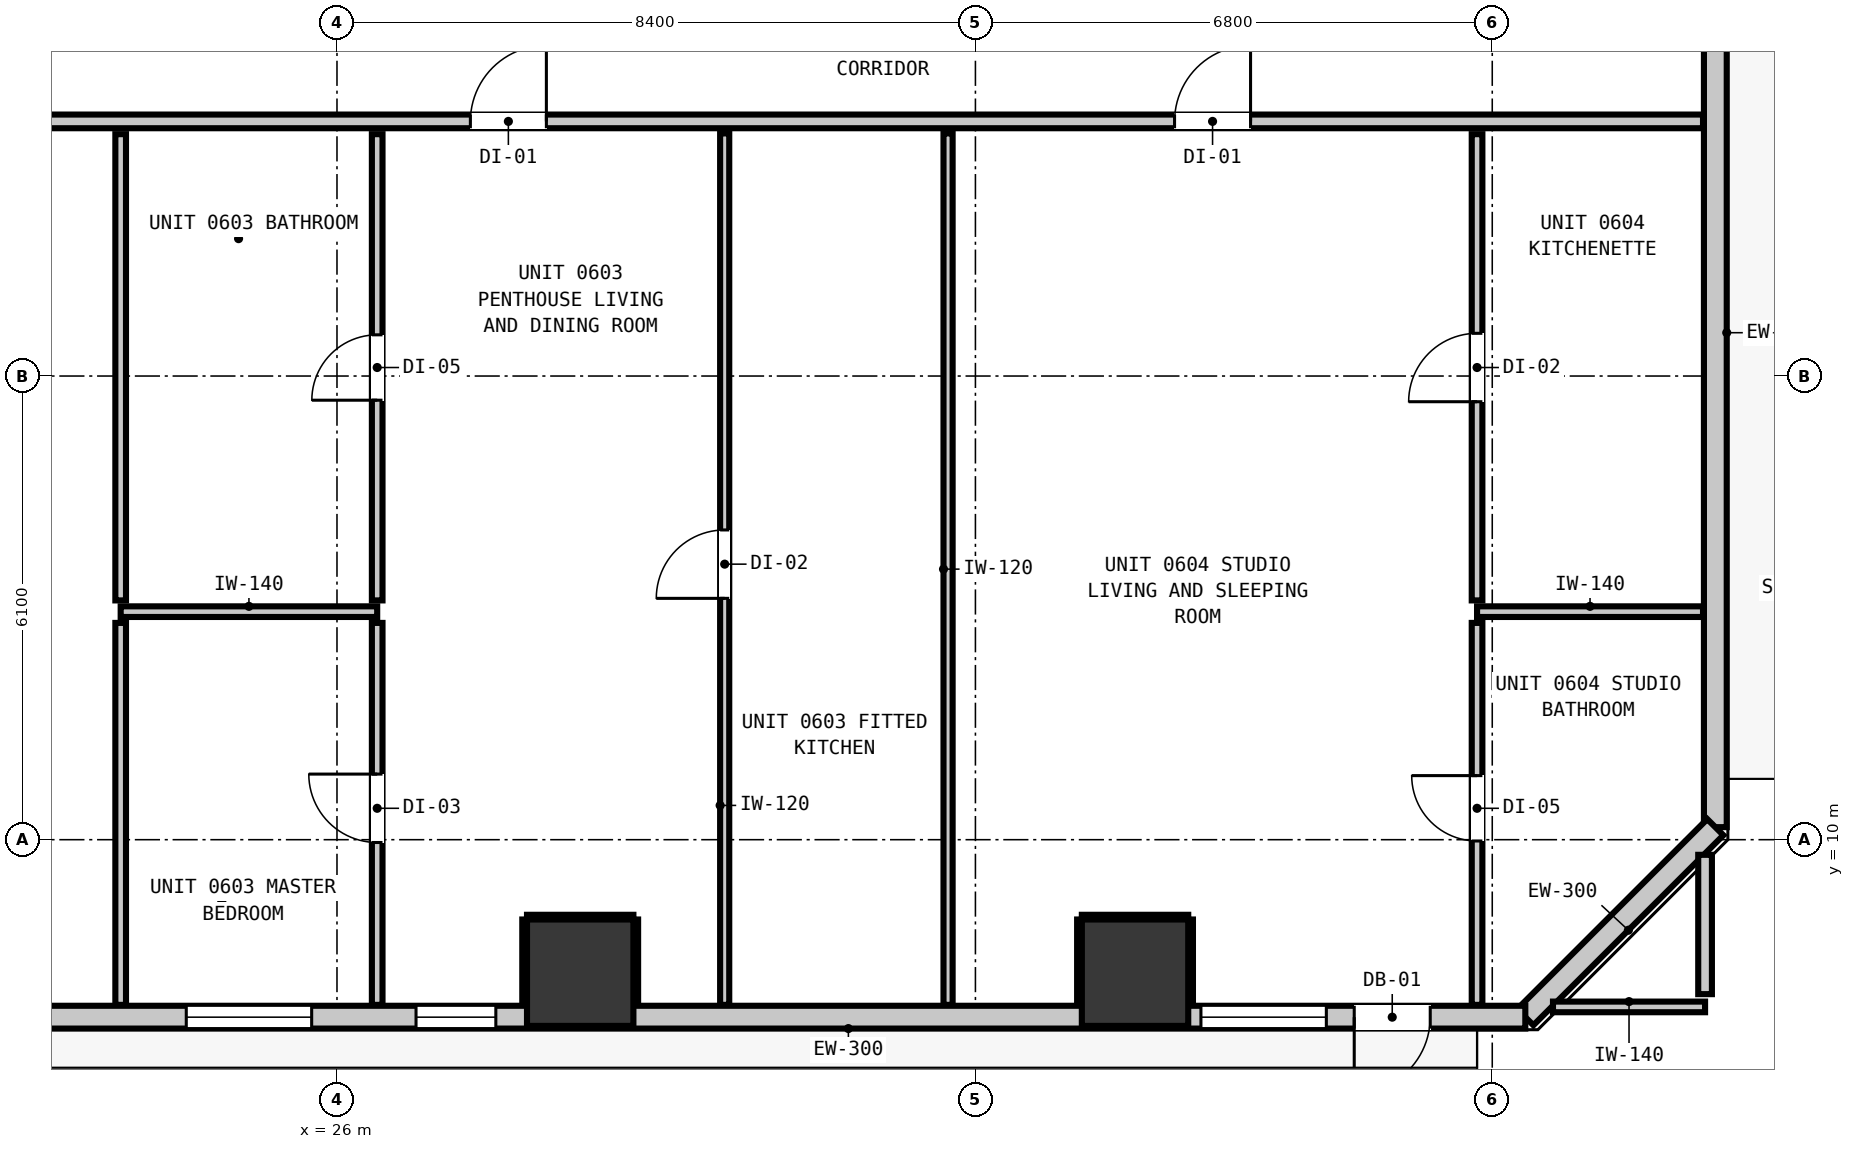
"""IFC4 building model, lengths in metres.
Left out: names, types, materials, properties, quantities, classifications, styles, units other than length and angle.
Written with IfcOpenShell. Run it as: python <this file> out.ifc"""

import sys

from ifc_helpers import new_model, si_unit, direction, frame, frame_2d, origin, origin_2d, place, context, subcontext, project, spatial, rectangle, extrude, element, fill, save


model = new_model("IFC4")
c1 = context("Model", 3, precision=1e-05, world=origin(), true_north=direction((0.0, 1.0)))
c2 = subcontext(c1, "Body", "Model", "MODEL_VIEW")
j1 = project(units=[si_unit("LENGTHUNIT", "METRE"), si_unit("PLANEANGLEUNIT", "RADIAN")], contexts=[c1])
p1 = place(None, origin())
s1 = spatial("IfcSite", under=j1, at=p1, CompositionType="ELEMENT")
p2 = place(p1, origin())
s2 = spatial("IfcBuilding", under=s1, at=p2, CompositionType="ELEMENT")
p3 = place(p2, frame((0.0, 0.0, 25.32)))
s3 = spatial("IfcBuildingStorey", under=s2, at=p3, CompositionType="ELEMENT", Elevation=25.32)
for number, where, z_axis, x_axis in (
    (1, (29.2, 8.25, 0.0), (0.0, 0.0, 1.0), (1.0, 0.0, 0.0)),
    (2, (36.5, 8.25, 0.0), (0.0, 0.0, 1.0), (1.0, 0.0, 0.0)),
):
    element("IfcColumn", number, at=place(p3, frame(where, z_axis=z_axis, x_axis=x_axis)), inside=s3, PredefinedType="COLUMN", context=c2, shape_type="SweptSolid", body=[
        extrude(rectangle(XDim=1.4, YDim=1.4, at=origin_2d()), origin(), (0.0, 0.0, 1.0), 3.32),
    ])
p4 = place(p3, frame((44.135, 44.835, 0.0), z_axis=(0.0, 0.0, 1.0), x_axis=(0.0, -1.0, 0.0)))
e3 = element("IfcWall", 3, at=p4, inside=s3, PredefinedType="STANDARD", context=c2, shape_type="SweptSolid", body=[
    extrude(rectangle(XDim=34.67, YDim=0.3, at=frame_2d((17.335, 0.0))), origin(), (0.0, 0.0, 1.0), 3.06),
])
p5 = place(p4, frame((0.901, 0.0, 0.0)))
e4 = element("IfcOpeningElement", 4, at=p5, cuts=e3, PredefinedType="OPENING", context=c2, shape_type="SweptSolid", body=[
    extrude(rectangle(XDim=1.0, YDim=2.15, at=frame_2d((0.5, 1.075))), frame((0.0, 0.16, 0.0), z_axis=(0.0, -1.0, 0.0), x_axis=(1.0, 0.0, 0.0)), (0.0, 0.0, 1.0), 0.32),
])
p6 = place(p4, frame((19.91, 0.0, 0.85)))
e5 = element("IfcOpeningElement", 5, at=p6, cuts=e3, PredefinedType="OPENING", context=c2, shape_type="SweptSolid", body=[
    extrude(rectangle(XDim=1.65, YDim=1.75, at=frame_2d((0.825, 0.875))), frame((0.0, 0.16, 0.0), z_axis=(0.0, -1.0, 0.0), x_axis=(1.0, 0.0, 0.0)), (0.0, 0.0, 1.0), 0.32),
])
p7 = place(p4, frame((7.126, 0.0, 0.85)))
e6 = element("IfcOpeningElement", 6, at=p7, cuts=e3, PredefinedType="OPENING", context=c2, shape_type="SweptSolid", body=[
    extrude(rectangle(XDim=1.65, YDim=1.75, at=frame_2d((0.825, 0.875))), frame((0.0, 0.16, 0.0), z_axis=(0.0, -1.0, 0.0), x_axis=(1.0, 0.0, 0.0)), (0.0, 0.0, 1.0), 0.32),
])
p8 = place(p3, frame((44.135, 10.165, 0.0), z_axis=(0.0, 0.0, 1.0), x_axis=(-0.707106781187, -0.707106781187, 0.0)))
e7 = element("IfcWall", 7, at=p8, inside=s3, PredefinedType="STANDARD", context=c2, shape_type="SweptSolid", body=[
    extrude(rectangle(XDim=3.536, YDim=0.3, at=frame_2d((1.768, 0.0))), origin(), (0.0, 0.0, 1.0), 3.06),
])
p9 = place(p3, frame((41.635, 7.665, 0.0), z_axis=(0.0, 0.0, 1.0), x_axis=(-1.0, 0.0, 0.0)))
e8 = element("IfcWall", 8, at=p9, inside=s3, PredefinedType="STANDARD", context=c2, shape_type="SweptSolid", body=[
    extrude(rectangle(XDim=37.47, YDim=0.3, at=frame_2d((18.735, 0.0))), origin(), (0.0, 0.0, 1.0), 3.06),
])
p10 = place(p9, frame((1.251, 0.0, 0.0)))
e9 = element("IfcOpeningElement", 9, at=p10, cuts=e8, PredefinedType="OPENING", context=c2, shape_type="SweptSolid", body=[
    extrude(rectangle(XDim=1.0, YDim=2.15, at=frame_2d((0.5, 1.075))), frame((0.0, 0.16, 0.0), z_axis=(0.0, -1.0, 0.0), x_axis=(1.0, 0.0, 0.0)), (0.0, 0.0, 1.0), 0.32),
])
p11 = place(p9, frame((32.01, 0.0, 0.85)))
e10 = element("IfcOpeningElement", 10, at=p11, cuts=e8, PredefinedType="OPENING", context=c2, shape_type="SweptSolid", body=[
    extrude(rectangle(XDim=1.65, YDim=1.75, at=frame_2d((0.825, 0.875))), frame((0.0, 0.16, 0.0), z_axis=(0.0, -1.0, 0.0), x_axis=(1.0, 0.0, 0.0)), (0.0, 0.0, 1.0), 0.32),
])
p12 = place(p9, frame((21.985, 0.0, 0.85)))
e11 = element("IfcOpeningElement", 11, at=p12, cuts=e8, PredefinedType="OPENING", context=c2, shape_type="SweptSolid", body=[
    extrude(rectangle(XDim=1.05, YDim=1.65, at=frame_2d((0.525, 0.825))), frame((0.0, 0.16, 0.0), z_axis=(0.0, -1.0, 0.0), x_axis=(1.0, 0.0, 0.0)), (0.0, 0.0, 1.0), 0.32),
])
p13 = place(p9, frame((13.545, 0.0, 0.85)))
e12 = element("IfcOpeningElement", 12, at=p13, cuts=e8, PredefinedType="OPENING", context=c2, shape_type="SweptSolid", body=[
    extrude(rectangle(XDim=1.05, YDim=1.65, at=frame_2d((0.525, 0.825))), frame((0.0, 0.16, 0.0), z_axis=(0.0, -1.0, 0.0), x_axis=(1.0, 0.0, 0.0)), (0.0, 0.0, 1.0), 0.32),
])
p14 = place(p9, frame((15.968, 0.0, 0.85)))
e13 = element("IfcOpeningElement", 13, at=p14, cuts=e8, PredefinedType="OPENING", context=c2, shape_type="SweptSolid", body=[
    extrude(rectangle(XDim=1.65, YDim=1.75, at=frame_2d((0.825, 0.875))), frame((0.0, 0.16, 0.0), z_axis=(0.0, -1.0, 0.0), x_axis=(1.0, 0.0, 0.0)), (0.0, 0.0, 1.0), 0.32),
])
p15 = place(p9, frame((2.618, 0.0, 0.85)))
e14 = element("IfcOpeningElement", 14, at=p15, cuts=e8, PredefinedType="OPENING", context=c2, shape_type="SweptSolid", body=[
    extrude(rectangle(XDim=1.65, YDim=1.75, at=frame_2d((0.825, 0.875))), frame((0.0, 0.16, 0.0), z_axis=(0.0, -1.0, 0.0), x_axis=(1.0, 0.0, 0.0)), (0.0, 0.0, 1.0), 0.32),
])
p16 = place(p3, frame((1.827, 19.45, 0.0), z_axis=(0.0, 0.0, 1.0), x_axis=(1.0, 0.0, 0.0)))
e15 = element("IfcWall", 15, at=p16, inside=s3, PredefinedType="PARTITIONING", context=c2, shape_type="SweptSolid", body=[
    extrude(rectangle(XDim=42.146, YDim=0.18, at=frame_2d((21.073, 0.0))), origin(), (0.0, 0.0, 1.0), 3.06),
])
p17 = place(p16, frame((10.283, 0.0, 0.0)))
e16 = element("IfcOpeningElement", 16, at=p17, cuts=e15, PredefinedType="OPENING", context=c2, shape_type="SweptSolid", body=[
    extrude(rectangle(XDim=1.0, YDim=2.15, at=frame_2d((0.5, 1.075))), frame((0.0, 0.1, 0.0), z_axis=(0.0, -1.0, 0.0), x_axis=(1.0, 0.0, 0.0)), (0.0, 0.0, 1.0), 0.2),
])
p18 = place(p16, frame((17.475, 0.0, 0.0)))
e17 = element("IfcOpeningElement", 17, at=p18, cuts=e15, PredefinedType="OPENING", context=c2, shape_type="SweptSolid", body=[
    extrude(rectangle(XDim=1.0, YDim=2.15, at=frame_2d((0.5, 1.075))), frame((0.0, 0.1, 0.0), z_axis=(0.0, -1.0, 0.0), x_axis=(1.0, 0.0, 0.0)), (0.0, 0.0, 1.0), 0.2),
])
p19 = place(p16, frame((25.928, 0.0, 0.0)))
e18 = element("IfcOpeningElement", 18, at=p19, cuts=e15, PredefinedType="OPENING", context=c2, shape_type="SweptSolid", body=[
    extrude(rectangle(XDim=1.0, YDim=2.15, at=frame_2d((0.5, 1.075))), frame((0.0, 0.1, 0.0), z_axis=(0.0, -1.0, 0.0), x_axis=(1.0, 0.0, 0.0)), (0.0, 0.0, 1.0), 0.2),
])
p20 = place(p16, frame((35.193, 0.0, 0.0)))
e19 = element("IfcOpeningElement", 19, at=p20, cuts=e15, PredefinedType="OPENING", context=c2, shape_type="SweptSolid", body=[
    extrude(rectangle(XDim=1.0, YDim=2.15, at=frame_2d((0.5, 1.075))), frame((0.0, 0.1, 0.0), z_axis=(0.0, -1.0, 0.0), x_axis=(1.0, 0.0, 0.0)), (0.0, 0.0, 1.0), 0.2),
])
p21 = place(p3, frame((41.999, 7.8, 0.0), z_axis=(0.0, 0.0, 1.0), x_axis=(1.0, 0.0, 0.0)))
e20 = element("IfcWall", 20, at=p21, inside=s3, PredefinedType="PARTITIONING", context=c2, shape_type="SweptSolid", body=[
    extrude(rectangle(XDim=2.001, YDim=0.14, at=frame_2d((1.0, 0.0))), origin(), (0.0, 0.0, 1.0), 3.06),
])
p22 = place(p3, frame((23.154, 13.0, 0.0), z_axis=(0.0, 0.0, 1.0), x_axis=(1.0, 0.0, 0.0)))
e21 = element("IfcWall", 21, at=p22, inside=s3, PredefinedType="PARTITIONING", context=c2, shape_type="SweptSolid", body=[
    extrude(rectangle(XDim=3.375, YDim=0.14, at=frame_2d((1.688, 0.0))), origin(), (0.0, 0.0, 1.0), 3.06),
])
p23 = place(p3, frame((41.0, 13.0, 0.0), z_axis=(0.0, 0.0, 1.0), x_axis=(1.0, 0.0, 0.0)))
e22 = element("IfcWall", 22, at=p23, inside=s3, PredefinedType="PARTITIONING", context=c2, shape_type="SweptSolid", body=[
    extrude(rectangle(XDim=2.973, YDim=0.14, at=frame_2d((1.486, 0.0))), origin(), (0.0, 0.0, 1.0), 3.06),
])
p24 = place(p3, frame((44.0, 7.968, 0.0), z_axis=(0.0, 0.0, 1.0), x_axis=(0.0, 1.0, 0.0)))
e23 = element("IfcWall", 23, at=p24, inside=s3, PredefinedType="PARTITIONING", context=c2, shape_type="SweptSolid", body=[
    extrude(rectangle(XDim=1.833, YDim=0.18, at=frame_2d((0.917, 0.0))), origin(), (0.0, 0.0, 1.0), 3.06),
])
p25 = place(p3, frame((23.154, 7.827, 0.0), z_axis=(0.0, 0.0, 1.0), x_axis=(0.0, 1.0, 0.0)))
e24 = element("IfcWall", 24, at=p25, inside=s3, PredefinedType="PARTITIONING", context=c2, shape_type="SweptSolid", body=[
    extrude(rectangle(XDim=5.025, YDim=0.14, at=frame_2d((2.513, 0.0))), origin(), (0.0, 0.0, 1.0), 3.06),
])
p26 = place(p3, frame((23.154, 13.148, 0.0), z_axis=(0.0, 0.0, 1.0), x_axis=(0.0, 1.0, 0.0)))
e25 = element("IfcWall", 25, at=p26, inside=s3, PredefinedType="PARTITIONING", context=c2, shape_type="SweptSolid", body=[
    extrude(rectangle(XDim=6.134, YDim=0.14, at=frame_2d((3.067, 0.0))), origin(), (0.0, 0.0, 1.0), 3.06),
])
p27 = place(p3, frame((26.529, 7.827, 0.0), z_axis=(0.0, 0.0, 1.0), x_axis=(0.0, 1.0, 0.0)))
e26 = element("IfcWall", 26, at=p27, inside=s3, PredefinedType="PARTITIONING", context=c2, shape_type="SweptSolid", body=[
    extrude(rectangle(XDim=5.025, YDim=0.14, at=frame_2d((2.513, 0.0))), origin(), (0.0, 0.0, 1.0), 3.06),
])
p28 = place(p27, frame((2.136, 0.0, 0.0)))
e27 = element("IfcOpeningElement", 27, at=p28, cuts=e26, PredefinedType="OPENING", context=c2, shape_type="SweptSolid", body=[
    extrude(rectangle(XDim=0.9, YDim=2.1, at=frame_2d((0.45, 1.05))), frame((0.0, 0.08, 0.0), z_axis=(0.0, -1.0, 0.0), x_axis=(1.0, 0.0, 0.0)), (0.0, 0.0, 1.0), 0.16),
])
p29 = place(p3, frame((26.529, 13.148, 0.0), z_axis=(0.0, 0.0, 1.0), x_axis=(0.0, 1.0, 0.0)))
e28 = element("IfcWall", 28, at=p29, inside=s3, PredefinedType="PARTITIONING", context=c2, shape_type="SweptSolid", body=[
    extrude(rectangle(XDim=6.134, YDim=0.14, at=frame_2d((3.067, 0.0))), origin(), (0.0, 0.0, 1.0), 3.06),
])
p30 = place(p29, frame((2.634, 0.0, 0.0)))
e29 = element("IfcOpeningElement", 29, at=p30, cuts=e28, PredefinedType="OPENING", context=c2, shape_type="SweptSolid", body=[
    extrude(rectangle(XDim=0.86, YDim=2.02, at=frame_2d((0.43, 1.01))), frame((0.0, 0.08, 0.0), z_axis=(0.0, -1.0, 0.0), x_axis=(1.0, 0.0, 0.0)), (0.0, 0.0, 1.0), 0.16),
])
p31 = place(p3, frame((41.0, 7.827, 0.0), z_axis=(0.0, 0.0, 1.0), x_axis=(0.0, 1.0, 0.0)))
e30 = element("IfcWall", 30, at=p31, inside=s3, PredefinedType="PARTITIONING", context=c2, shape_type="SweptSolid", body=[
    extrude(rectangle(XDim=5.025, YDim=0.14, at=frame_2d((2.513, 0.0))), origin(), (0.0, 0.0, 1.0), 3.06),
])
p32 = place(p31, frame((2.156, 0.0, 0.0)))
e31 = element("IfcOpeningElement", 31, at=p32, cuts=e30, PredefinedType="OPENING", context=c2, shape_type="SweptSolid", body=[
    extrude(rectangle(XDim=0.86, YDim=2.02, at=frame_2d((0.43, 1.01))), frame((0.0, 0.08, 0.0), z_axis=(0.0, -1.0, 0.0), x_axis=(1.0, 0.0, 0.0)), (0.0, 0.0, 1.0), 0.16),
])
p33 = place(p3, frame((41.0, 13.148, 0.0), z_axis=(0.0, 0.0, 1.0), x_axis=(0.0, 1.0, 0.0)))
e32 = element("IfcWall", 32, at=p33, inside=s3, PredefinedType="PARTITIONING", context=c2, shape_type="SweptSolid", body=[
    extrude(rectangle(XDim=6.134, YDim=0.14, at=frame_2d((3.067, 0.0))), origin(), (0.0, 0.0, 1.0), 2.445),
])
p34 = place(p33, frame((2.614, 0.0, 0.0)))
e33 = element("IfcOpeningElement", 33, at=p34, cuts=e32, PredefinedType="OPENING", context=c2, shape_type="SweptSolid", body=[
    extrude(rectangle(XDim=0.9, YDim=2.1, at=frame_2d((0.45, 1.05))), frame((0.0, 0.08, 0.0), z_axis=(0.0, -1.0, 0.0), x_axis=(1.0, 0.0, 0.0)), (0.0, 0.0, 1.0), 0.16),
])
p35 = place(p3, frame((31.101, 7.827, 0.0), z_axis=(0.0, 0.0, 1.0), x_axis=(0.0, 1.0, 0.0)))
e34 = element("IfcWall", 34, at=p35, inside=s3, PredefinedType="PARTITIONING", context=c2, shape_type="SweptSolid", body=[
    extrude(rectangle(XDim=11.465, YDim=0.12, at=frame_2d((5.732, 0.0))), origin(), (0.0, 0.0, 1.0), 3.06),
])
p36 = place(p35, frame((5.348, 0.0, 0.0)))
e35 = element("IfcOpeningElement", 35, at=p36, cuts=e34, PredefinedType="OPENING", context=c2, shape_type="SweptSolid", body=[
    extrude(rectangle(XDim=0.9, YDim=2.1, at=frame_2d((0.45, 1.05))), frame((0.0, 0.07, 0.0), z_axis=(0.0, -1.0, 0.0), x_axis=(1.0, 0.0, 0.0)), (0.0, 0.0, 1.0), 0.14),
])
p37 = place(p3, frame((34.04, 7.827, 0.0), z_axis=(0.0, 0.0, 1.0), x_axis=(0.0, 1.0, 0.0)))
e36 = element("IfcWall", 36, at=p37, inside=s3, PredefinedType="PARTITIONING", context=c2, shape_type="SweptSolid", body=[
    extrude(rectangle(XDim=11.465, YDim=0.12, at=frame_2d((5.732, 0.0))), origin(), (0.0, 0.0, 1.0), 3.06),
])
p38 = place(p3, frame((28.5, 8.982, 0.0), z_axis=(0.0, 0.0, 1.0), x_axis=(1.0, 0.0, 0.0)))
e37 = element("IfcWall", 37, at=p38, inside=s3, PredefinedType="PARTITIONING", context=c2, shape_type="SweptSolid", body=[
    extrude(rectangle(XDim=1.4, YDim=0.06, at=frame_2d((0.7, 0.0))), origin(), (0.0, 0.0, 1.0), 1.45),
])
for number, where, z_axis, x_axis in (
    (38, (28.468, 7.83, 0.0), (0.0, 0.0, 1.0), (0.0, 1.0, 0.0)),
    (39, (29.932, 7.83, 0.0), (0.0, 0.0, 1.0), (0.0, 1.0, 0.0)),
):
    element("IfcWall", number, at=place(p3, frame(where, z_axis=z_axis, x_axis=x_axis)), inside=s3, PredefinedType="PARTITIONING", context=c2, shape_type="SweptSolid", body=[
        extrude(rectangle(XDim=1.12, YDim=0.06, at=frame_2d((0.56, 0.0))), origin(), (0.0, 0.0, 1.0), 1.45),
    ])
p39 = place(p3, frame((35.8, 8.982, 0.0), z_axis=(0.0, 0.0, 1.0), x_axis=(1.0, 0.0, 0.0)))
e40 = element("IfcWall", 40, at=p39, inside=s3, PredefinedType="PARTITIONING", context=c2, shape_type="SweptSolid", body=[
    extrude(rectangle(XDim=1.4, YDim=0.06, at=frame_2d((0.7, 0.0))), origin(), (0.0, 0.0, 1.0), 1.45),
])
for number, where, z_axis, x_axis in (
    (41, (35.768, 7.83, 0.0), (0.0, 0.0, 1.0), (0.0, 1.0, 0.0)),
    (42, (37.232, 7.83, 0.0), (0.0, 0.0, 1.0), (0.0, 1.0, 0.0)),
):
    element("IfcWall", number, at=place(p3, frame(where, z_axis=z_axis, x_axis=x_axis)), inside=s3, PredefinedType="PARTITIONING", context=c2, shape_type="SweptSolid", body=[
        extrude(rectangle(XDim=1.12, YDim=0.06, at=frame_2d((0.56, 0.0))), origin(), (0.0, 0.0, 1.0), 1.45),
    ])
p40 = place(p10, origin())
e43 = element("IfcDoor", 43, at=p40, inside=s3, OperationType="SINGLE_SWING_RIGHT", PredefinedType="DOOR", context=c2, shape_type="SweptSolid", body=[
    extrude(rectangle(XDim=1.0, YDim=2.15, at=frame_2d((0.5, 1.075))), frame((0.0, 0.025, 0.0), z_axis=(0.0, -1.0, 0.0), x_axis=(1.0, 0.0, 0.0)), (0.0, 0.0, 1.0), 0.05),
])
fill(e9, e43)
p41 = place(p13, origin())
e44 = element("IfcWindow", 44, at=p41, inside=s3, PartitioningType="SINGLE_PANEL", PredefinedType="WINDOW", context=c2, shape_type="SweptSolid", body=[
    extrude(rectangle(XDim=1.05, YDim=1.65, at=frame_2d((0.525, 0.825))), frame((0.0, 0.03, 0.0), z_axis=(0.0, -1.0, 0.0), x_axis=(1.0, 0.0, 0.0)), (0.0, 0.0, 1.0), 0.06),
])
fill(e12, e44)
p42 = place(p14, origin())
e45 = element("IfcWindow", 45, at=p42, inside=s3, PartitioningType="SINGLE_PANEL", PredefinedType="WINDOW", context=c2, shape_type="SweptSolid", body=[
    extrude(rectangle(XDim=1.65, YDim=1.75, at=frame_2d((0.825, 0.875))), frame((0.0, 0.03, 0.0), z_axis=(0.0, -1.0, 0.0), x_axis=(1.0, 0.0, 0.0)), (0.0, 0.0, 1.0), 0.06),
])
fill(e13, e45)
p43 = place(p15, origin())
e46 = element("IfcWindow", 46, at=p43, inside=s3, PartitioningType="SINGLE_PANEL", PredefinedType="WINDOW", context=c2, shape_type="SweptSolid", body=[
    extrude(rectangle(XDim=1.65, YDim=1.75, at=frame_2d((0.825, 0.875))), frame((0.0, 0.03, 0.0), z_axis=(0.0, -1.0, 0.0), x_axis=(1.0, 0.0, 0.0)), (0.0, 0.0, 1.0), 0.06),
])
fill(e14, e46)
p44 = place(p19, origin())
e47 = element("IfcDoor", 47, at=p44, inside=s3, OperationType="SINGLE_SWING_RIGHT", PredefinedType="DOOR", context=c2, shape_type="SweptSolid", body=[
    extrude(rectangle(XDim=1.0, YDim=2.15, at=frame_2d((0.5, 1.075))), frame((0.0, 0.025, 0.0), z_axis=(0.0, -1.0, 0.0), x_axis=(1.0, 0.0, 0.0)), (0.0, 0.0, 1.0), 0.05),
])
fill(e18, e47)
p45 = place(p30, origin())
e48 = element("IfcDoor", 48, at=p45, inside=s3, OperationType="SINGLE_SWING_LEFT", PredefinedType="DOOR", context=c2, shape_type="SweptSolid", body=[
    extrude(rectangle(XDim=0.86, YDim=2.02, at=frame_2d((0.43, 1.01))), frame((0.0, 0.025, 0.0), z_axis=(0.0, -1.0, 0.0), x_axis=(1.0, 0.0, 0.0)), (0.0, 0.0, 1.0), 0.05),
])
fill(e29, e48)
p46 = place(p28, origin())
e49 = element("IfcDoor", 49, at=p46, inside=s3, OperationType="SINGLE_SWING_RIGHT", PredefinedType="DOOR", context=c2, shape_type="SweptSolid", body=[
    extrude(rectangle(XDim=0.9, YDim=2.1, at=frame_2d((0.45, 1.05))), frame((0.0, 0.025, 0.0), z_axis=(0.0, -1.0, 0.0), x_axis=(1.0, 0.0, 0.0)), (0.0, 0.0, 1.0), 0.05),
])
fill(e27, e49)
p47 = place(p36, origin())
e50 = element("IfcDoor", 50, at=p47, inside=s3, OperationType="SINGLE_SWING_LEFT", PredefinedType="DOOR", context=c2, shape_type="SweptSolid", body=[
    extrude(rectangle(XDim=0.9, YDim=2.1, at=frame_2d((0.45, 1.05))), frame((0.0, 0.025, 0.0), z_axis=(0.0, -1.0, 0.0), x_axis=(1.0, 0.0, 0.0)), (0.0, 0.0, 1.0), 0.05),
])
fill(e35, e50)
p48 = place(p20, origin())
e51 = element("IfcDoor", 51, at=p48, inside=s3, OperationType="SINGLE_SWING_RIGHT", PredefinedType="DOOR", context=c2, shape_type="SweptSolid", body=[
    extrude(rectangle(XDim=1.0, YDim=2.15, at=frame_2d((0.5, 1.075))), frame((0.0, 0.025, 0.0), z_axis=(0.0, -1.0, 0.0), x_axis=(1.0, 0.0, 0.0)), (0.0, 0.0, 1.0), 0.05),
])
fill(e19, e51)
p49 = place(p34, origin())
e52 = element("IfcDoor", 52, at=p49, inside=s3, OperationType="SINGLE_SWING_LEFT", PredefinedType="DOOR", context=c2, shape_type="SweptSolid", body=[
    extrude(rectangle(XDim=0.9, YDim=2.1, at=frame_2d((0.45, 1.05))), frame((0.0, 0.025, 0.0), z_axis=(0.0, -1.0, 0.0), x_axis=(1.0, 0.0, 0.0)), (0.0, 0.0, 1.0), 0.05),
])
fill(e33, e52)
p50 = place(p32, origin())
e53 = element("IfcDoor", 53, at=p50, inside=s3, OperationType="SINGLE_SWING_RIGHT", PredefinedType="DOOR", context=c2, shape_type="SweptSolid", body=[
    extrude(rectangle(XDim=0.86, YDim=2.02, at=frame_2d((0.43, 1.01))), frame((0.0, 0.025, 0.0), z_axis=(0.0, -1.0, 0.0), x_axis=(1.0, 0.0, 0.0)), (0.0, 0.0, 1.0), 0.05),
])
fill(e31, e53)
save(model, sys.argv[1])
